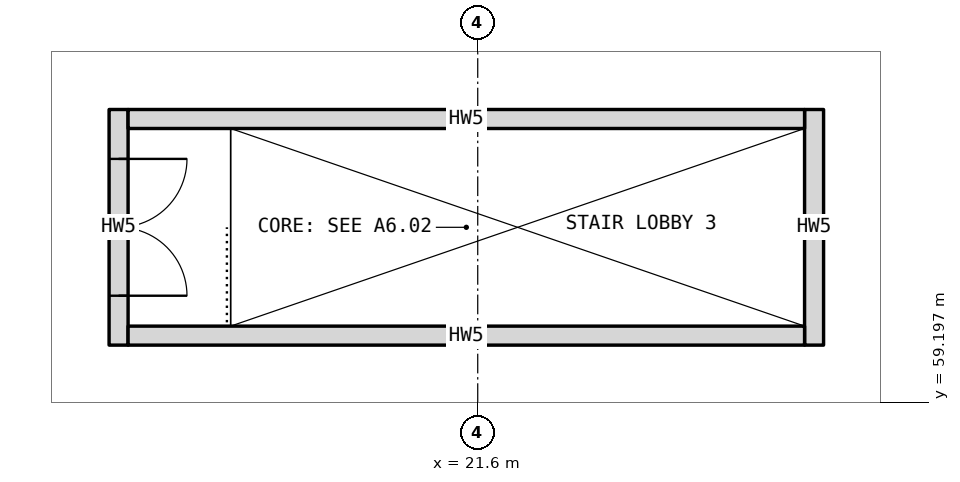
"""IFC4 building model, lengths in metres.
Left out: names, types, materials, properties, quantities, classifications, styles, units other than length and angle.
Written with IfcOpenShell. Run it as: python <this file> out.ifc"""

import sys

from ifc_helpers import new_model, si_unit, direction, frame, frame_2d, origin, place, context, subcontext, project, spatial, rectangle, extrude, element, fill, save


model = new_model("IFC4")
c1 = context("Model", 3, precision=1e-05, world=origin(), true_north=direction((0.0, 1.0)))
c2 = subcontext(c1, "Body", "Model", "MODEL_VIEW")
j1 = project(units=[si_unit("LENGTHUNIT", "METRE"), si_unit("PLANEANGLEUNIT", "RADIAN")], contexts=[c1])
p1 = place(None, origin())
s1 = spatial("IfcSite", under=j1, at=p1, CompositionType="ELEMENT")
p2 = place(p1, origin())
s2 = spatial("IfcBuilding", under=s1, at=p2, CompositionType="ELEMENT")
p3 = place(p2, origin())
s3 = spatial("IfcBuildingStorey", under=s2, at=p3, CompositionType="ELEMENT", Elevation=0.0)
p4 = place(p3, frame((16.875, 59.95, 0.0), z_axis=(0.0, 0.0, 1.0), x_axis=(0.0, 1.0, 0.0)))
e1 = element("IfcWall", 1, at=p4, inside=s3, PredefinedType="SOLIDWALL", context=c2, shape_type="SweptSolid", body=[
    extrude(rectangle(XDim=3.1, YDim=0.25, at=frame_2d((1.55, 0.0))), origin(), (0.0, 0.0, 1.0), 3.2),
])
p5 = place(p4, frame((0.65, 0.0, 0.0)))
e2 = element("IfcOpeningElement", 2, at=p5, cuts=e1, PredefinedType="OPENING", context=c2, shape_type="SweptSolid", body=[
    extrude(rectangle(XDim=1.8, YDim=2.1, at=frame_2d((0.9, 1.05))), frame((0.0, 0.135, 0.0), z_axis=(0.0, -1.0, 0.0), x_axis=(1.0, 0.0, 0.0)), (0.0, 0.0, 1.0), 0.27),
])
p6 = place(p3, frame((26.025, 59.95, 0.0), z_axis=(0.0, 0.0, 1.0), x_axis=(0.0, 1.0, 0.0)))
e3 = element("IfcWall", 3, at=p6, inside=s3, PredefinedType="SOLIDWALL", context=c2, shape_type="SweptSolid", body=[
    extrude(rectangle(XDim=3.1, YDim=0.25, at=frame_2d((1.55, 0.0))), origin(), (0.0, 0.0, 1.0), 3.2),
])
for number, where, z_axis, x_axis in (
    (4, (17.0, 60.075, 0.0), (0.0, 0.0, 1.0), (1.0, 0.0, 0.0)),
    (5, (17.0, 62.925, 0.0), (0.0, 0.0, 1.0), (1.0, 0.0, 0.0)),
):
    element("IfcWall", number, at=place(p3, frame(where, z_axis=z_axis, x_axis=x_axis)), inside=s3, PredefinedType="SOLIDWALL", context=c2, shape_type="SweptSolid", body=[
        extrude(rectangle(XDim=8.9, YDim=0.25, at=frame_2d((4.45, 0.0))), origin(), (0.0, 0.0, 1.0), 3.2),
    ])
p7 = place(p5, frame((1.8, 0.0, 0.0), z_axis=(0.0, 0.0, 1.0), x_axis=(-1.0, 0.0, 0.0)))
e6 = element("IfcDoor", 6, at=p7, inside=s3, OperationType="DOUBLE_DOOR_SINGLE_SWING", PredefinedType="DOOR", context=c2, shape_type="SweptSolid", body=[
    extrude(rectangle(XDim=1.8, YDim=2.1, at=frame_2d((0.9, 1.05))), frame((0.0, 0.025, 0.0), z_axis=(0.0, -1.0, 0.0), x_axis=(1.0, 0.0, 0.0)), (0.0, 0.0, 1.0), 0.05),
])
fill(e2, e6)
save(model, sys.argv[1])
